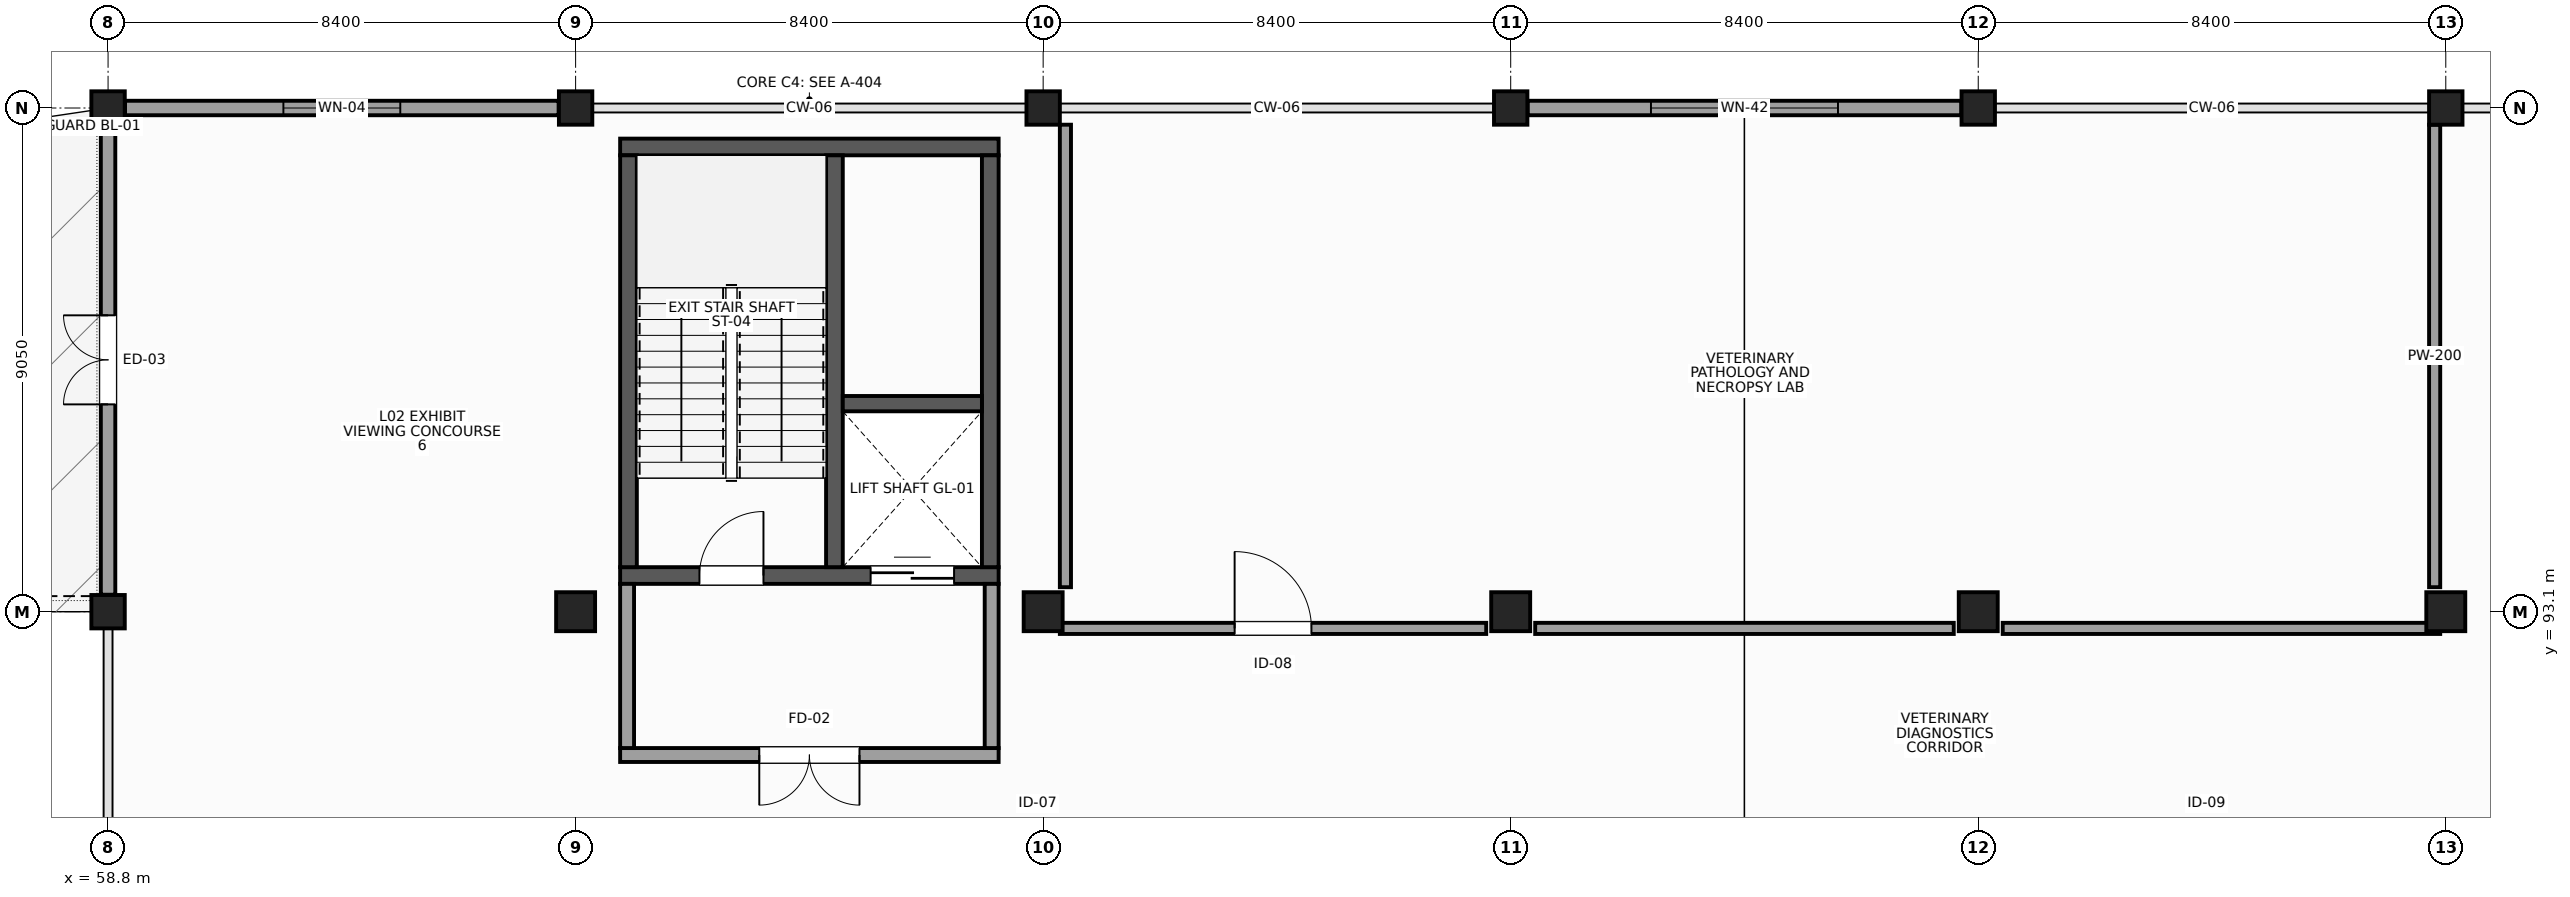
"""IFC4 building model, lengths in metres.
Left out: names, types, materials, properties, quantities, classifications, styles, units other than length and angle.
Written with IfcOpenShell. Run it as: python <this file> out.ifc"""

import sys

from ifc_helpers import new_model, si_unit, direction, frame, frame_2d, origin, origin_2d, place, context, subcontext, project, spatial, rectangle, extrude, element, fill, save


model = new_model("IFC4")
c1 = context("Model", 3, precision=1e-05, world=origin(), true_north=direction((0.0, 1.0)))
c2 = subcontext(c1, "Body", "Model", "MODEL_VIEW")
j1 = project(units=[si_unit("LENGTHUNIT", "METRE"), si_unit("PLANEANGLEUNIT", "RADIAN")], contexts=[c1])
p1 = place(None, origin())
s1 = spatial("IfcSite", under=j1, at=p1, CompositionType="ELEMENT")
p2 = place(p1, origin())
s2 = spatial("IfcBuilding", under=s1, at=p2, CompositionType="ELEMENT")
p3 = place(p2, frame((0.0, 0.0, 10.8)))
s3 = spatial("IfcBuildingStorey", under=s2, at=p3, CompositionType="ELEMENT", Elevation=10.8)
for number, where, z_axis, x_axis in (
    (1, (58.8, 93.1, 0.0), (0.0, 0.0, 1.0), (1.0, 0.0, 0.0)),
    (2, (58.8, 102.15, 0.0), (0.0, 0.0, 1.0), (1.0, 0.0, 0.0)),
):
    element("IfcColumn", number, at=place(p3, frame(where, z_axis=z_axis, x_axis=x_axis)), inside=s3, PredefinedType="COLUMN", context=c2, shape_type="SweptSolid", body=[
        extrude(rectangle(XDim=0.6, YDim=0.6, at=origin_2d()), origin(), (0.0, 0.0, 1.0), 4.8),
    ])
p4 = place(p3, frame((67.2, 93.1, 0.0), z_axis=(0.0, 0.0, 1.0), x_axis=(1.0, 0.0, 0.0)))
e3 = element("IfcColumn", 3, at=p4, inside=s3, PredefinedType="COLUMN", context=c2, shape_type="SweptSolid", body=[
    extrude(rectangle(XDim=0.7, YDim=0.7, at=origin_2d()), origin(), (0.0, 0.0, 1.0), 4.8),
])
p5 = place(p3, frame((67.2, 102.15, 0.0), z_axis=(0.0, 0.0, 1.0), x_axis=(1.0, 0.0, 0.0)))
e4 = element("IfcColumn", 4, at=p5, inside=s3, PredefinedType="COLUMN", context=c2, shape_type="SweptSolid", body=[
    extrude(rectangle(XDim=0.6, YDim=0.6, at=origin_2d()), origin(), (0.0, 0.0, 1.0), 4.8),
])
p6 = place(p3, frame((75.6, 93.1, 0.0), z_axis=(0.0, 0.0, 1.0), x_axis=(1.0, 0.0, 0.0)))
e5 = element("IfcColumn", 5, at=p6, inside=s3, PredefinedType="COLUMN", context=c2, shape_type="SweptSolid", body=[
    extrude(rectangle(XDim=0.7, YDim=0.7, at=origin_2d()), origin(), (0.0, 0.0, 1.0), 4.8),
])
p7 = place(p3, frame((75.6, 102.15, 0.0), z_axis=(0.0, 0.0, 1.0), x_axis=(1.0, 0.0, 0.0)))
e6 = element("IfcColumn", 6, at=p7, inside=s3, PredefinedType="COLUMN", context=c2, shape_type="SweptSolid", body=[
    extrude(rectangle(XDim=0.6, YDim=0.6, at=origin_2d()), origin(), (0.0, 0.0, 1.0), 4.8),
])
p8 = place(p3, frame((84.0, 93.1, 0.0), z_axis=(0.0, 0.0, 1.0), x_axis=(1.0, 0.0, 0.0)))
e7 = element("IfcColumn", 7, at=p8, inside=s3, PredefinedType="COLUMN", context=c2, shape_type="SweptSolid", body=[
    extrude(rectangle(XDim=0.7, YDim=0.7, at=origin_2d()), origin(), (0.0, 0.0, 1.0), 4.8),
])
p9 = place(p3, frame((84.0, 102.15, 0.0), z_axis=(0.0, 0.0, 1.0), x_axis=(1.0, 0.0, 0.0)))
e8 = element("IfcColumn", 8, at=p9, inside=s3, PredefinedType="COLUMN", context=c2, shape_type="SweptSolid", body=[
    extrude(rectangle(XDim=0.6, YDim=0.6, at=origin_2d()), origin(), (0.0, 0.0, 1.0), 4.8),
])
p10 = place(p3, frame((92.4, 93.1, 0.0), z_axis=(0.0, 0.0, 1.0), x_axis=(1.0, 0.0, 0.0)))
e9 = element("IfcColumn", 9, at=p10, inside=s3, PredefinedType="COLUMN", context=c2, shape_type="SweptSolid", body=[
    extrude(rectangle(XDim=0.7, YDim=0.7, at=origin_2d()), origin(), (0.0, 0.0, 1.0), 4.8),
])
p11 = place(p3, frame((92.4, 102.15, 0.0), z_axis=(0.0, 0.0, 1.0), x_axis=(1.0, 0.0, 0.0)))
e10 = element("IfcColumn", 10, at=p11, inside=s3, PredefinedType="COLUMN", context=c2, shape_type="SweptSolid", body=[
    extrude(rectangle(XDim=0.6, YDim=0.6, at=origin_2d()), origin(), (0.0, 0.0, 1.0), 4.8),
])
p12 = place(p3, frame((100.8, 93.1, 0.0), z_axis=(0.0, 0.0, 1.0), x_axis=(1.0, 0.0, 0.0)))
e11 = element("IfcColumn", 11, at=p12, inside=s3, PredefinedType="COLUMN", context=c2, shape_type="SweptSolid", body=[
    extrude(rectangle(XDim=0.7, YDim=0.7, at=origin_2d()), origin(), (0.0, 0.0, 1.0), 4.8),
])
p13 = place(p3, frame((100.8, 102.15, 0.0), z_axis=(0.0, 0.0, 1.0), x_axis=(1.0, 0.0, 0.0)))
e12 = element("IfcColumn", 12, at=p13, inside=s3, PredefinedType="COLUMN", context=c2, shape_type="SweptSolid", body=[
    extrude(rectangle(XDim=0.6, YDim=0.6, at=origin_2d()), origin(), (0.0, 0.0, 1.0), 4.8),
])
p14 = place(p3, frame((92.095, 102.15, 0.0), z_axis=(0.0, 0.0, 1.0), x_axis=(-1.0, 0.0, 0.0)))
e13 = element("IfcWall", 13, at=p14, inside=s3, PredefinedType="STANDARD", context=c2, shape_type="SweptSolid", body=[
    extrude(rectangle(XDim=7.79, YDim=0.26, at=frame_2d((3.895, 0.0))), origin(), (0.0, 0.0, 1.0), 3.63),
])
p15 = place(p14, frame((2.215, 0.0, 0.95)))
e14 = element("IfcOpeningElement", 14, at=p15, cuts=e13, PredefinedType="OPENING", context=c2, shape_type="SweptSolid", body=[
    extrude(rectangle(XDim=3.36, YDim=1.96, at=frame_2d((1.68, 0.98))), frame((0.0, 0.14, 0.0), z_axis=(0.0, -1.0, 0.0), x_axis=(1.0, 0.0, 0.0)), (0.0, 0.0, 1.0), 0.28),
])
p16 = place(p3, frame((66.895, 102.15, 0.0), z_axis=(0.0, 0.0, 1.0), x_axis=(-1.0, 0.0, 0.0)))
e15 = element("IfcWall", 15, at=p16, inside=s3, PredefinedType="STANDARD", context=c2, shape_type="SweptSolid", body=[
    extrude(rectangle(XDim=7.79, YDim=0.26, at=frame_2d((3.895, 0.0))), origin(), (0.0, 0.0, 1.0), 3.63),
])
p17 = place(p16, frame((2.845, 0.0, 0.95)))
e16 = element("IfcOpeningElement", 16, at=p17, cuts=e15, PredefinedType="OPENING", context=c2, shape_type="SweptSolid", body=[
    extrude(rectangle(XDim=2.1, YDim=2.1, at=frame_2d((1.05, 1.05))), frame((0.0, 0.14, 0.0), z_axis=(0.0, -1.0, 0.0), x_axis=(1.0, 0.0, 0.0)), (0.0, 0.0, 1.0), 0.28),
])
p18 = place(p3, frame((58.8, 101.845, 0.0), z_axis=(0.0, 0.0, 1.0), x_axis=(0.0, -1.0, 0.0)))
e17 = element("IfcWall", 17, at=p18, inside=s3, PredefinedType="STANDARD", context=c2, shape_type="SweptSolid", body=[
    extrude(rectangle(XDim=8.44, YDim=0.26, at=frame_2d((4.22, 0.0))), origin(), (0.0, 0.0, 1.0), 3.65),
])
p19 = place(p18, frame((3.42, 0.0, 0.0)))
e18 = element("IfcOpeningElement", 18, at=p19, cuts=e17, PredefinedType="OPENING", context=c2, shape_type="SweptSolid", body=[
    extrude(rectangle(XDim=1.6, YDim=2.25, at=frame_2d((0.8, 1.125))), frame((0.0, 0.14, 0.0), z_axis=(0.0, -1.0, 0.0), x_axis=(1.0, 0.0, 0.0)), (0.0, 0.0, 1.0), 0.28),
])
p20 = place(p3, frame((68.0, 93.75, 0.0), z_axis=(0.0, 0.0, 1.0), x_axis=(1.0, 0.0, 0.0)))
e19 = element("IfcWall", 19, at=p20, inside=s3, PredefinedType="SHEAR", context=c2, shape_type="SweptSolid", body=[
    extrude(rectangle(XDim=6.8, YDim=0.3, at=frame_2d((3.4, 0.0))), origin(), (0.0, 0.0, 1.0), 4.5),
])
p21 = place(p20, frame((1.425, 0.0, 0.0)))
e20 = element("IfcOpeningElement", 20, at=p21, cuts=e19, PredefinedType="OPENING", context=c2, shape_type="SweptSolid", body=[
    extrude(rectangle(XDim=1.15, YDim=2.2, at=frame_2d((0.575, 1.1))), frame((0.0, 0.16, 0.0), z_axis=(0.0, -1.0, 0.0), x_axis=(1.0, 0.0, 0.0)), (0.0, 0.0, 1.0), 0.32),
])
p22 = place(p20, frame((4.5, 0.0, 0.0)))
e21 = element("IfcOpeningElement", 21, at=p22, cuts=e19, PredefinedType="OPENING", context=c2, shape_type="SweptSolid", body=[
    extrude(rectangle(XDim=1.5, YDim=2.3, at=frame_2d((0.75, 1.15))), frame((0.0, 0.16, 0.0), z_axis=(0.0, -1.0, 0.0), x_axis=(1.0, 0.0, 0.0)), (0.0, 0.0, 1.0), 0.32),
])
p23 = place(p3, frame((68.0, 101.45, 0.0), z_axis=(0.0, 0.0, 1.0), x_axis=(1.0, 0.0, 0.0)))
e22 = element("IfcWall", 22, at=p23, inside=s3, PredefinedType="SHEAR", context=c2, shape_type="SweptSolid", body=[
    extrude(rectangle(XDim=6.8, YDim=0.3, at=frame_2d((3.4, 0.0))), origin(), (0.0, 0.0, 1.0), 4.5),
])
for number, where, z_axis, x_axis in (
    (23, (68.15, 93.9, 0.0), (0.0, 0.0, 1.0), (0.0, 1.0, 0.0)),
    (24, (74.65, 93.9, 0.0), (0.0, 0.0, 1.0), (0.0, 1.0, 0.0)),
    (25, (71.85, 93.9, 0.0), (0.0, 0.0, 1.0), (0.0, 1.0, 0.0)),
):
    element("IfcWall", number, at=place(p3, frame(where, z_axis=z_axis, x_axis=x_axis)), inside=s3, PredefinedType="SHEAR", context=c2, shape_type="SweptSolid", body=[
        extrude(rectangle(XDim=7.4, YDim=0.3, at=frame_2d((3.7, 0.0))), origin(), (0.0, 0.0, 1.0), 4.5),
    ])
p24 = place(p3, frame((72.0, 96.838, 0.0), z_axis=(0.0, 0.0, 1.0), x_axis=(1.0, 0.0, 0.0)))
e26 = element("IfcWall", 26, at=p24, inside=s3, PredefinedType="SHEAR", context=c2, shape_type="SweptSolid", body=[
    extrude(rectangle(XDim=2.5, YDim=0.275, at=frame_2d((1.25, 0.0))), origin(), (0.0, 0.0, 1.0), 4.5),
])
p25 = place(p3, frame((68.0, 90.525, 0.0), z_axis=(0.0, 0.0, 1.0), x_axis=(1.0, 0.0, 0.0)))
e27 = element("IfcWall", 27, at=p25, inside=s3, PredefinedType="PARTITIONING", context=c2, shape_type="SweptSolid", body=[
    extrude(rectangle(XDim=6.8, YDim=0.25, at=frame_2d((3.4, 0.0))), origin(), (0.0, 0.0, 1.0), 4.5),
])
p26 = place(p25, frame((2.5, 0.0, 0.0)))
e28 = element("IfcOpeningElement", 28, at=p26, cuts=e27, PredefinedType="OPENING", context=c2, shape_type="SweptSolid", body=[
    extrude(rectangle(XDim=1.8, YDim=2.25, at=frame_2d((0.9, 1.125))), frame((0.0, 0.135, 0.0), z_axis=(0.0, -1.0, 0.0), x_axis=(1.0, 0.0, 0.0)), (0.0, 0.0, 1.0), 0.27),
])
for number, where, z_axis, x_axis in (
    (29, (68.125, 90.65, 0.0), (0.0, 0.0, 1.0), (0.0, 1.0, 0.0)),
    (30, (74.675, 90.65, 0.0), (0.0, 0.0, 1.0), (0.0, 1.0, 0.0)),
):
    element("IfcWall", number, at=place(p3, frame(where, z_axis=z_axis, x_axis=x_axis)), inside=s3, PredefinedType="PARTITIONING", context=c2, shape_type="SweptSolid", body=[
        extrude(rectangle(XDim=2.95, YDim=0.25, at=frame_2d((1.475, 0.0))), origin(), (0.0, 0.0, 1.0), 3.73),
    ])
p27 = place(p3, frame((75.9, 92.8, 0.0), z_axis=(0.0, 0.0, 1.0), x_axis=(1.0, 0.0, 0.0)))
e31 = element("IfcWall", 31, at=p27, inside=s3, PredefinedType="PARTITIONING", context=c2, shape_type="SweptSolid", body=[
    extrude(rectangle(XDim=7.66, YDim=0.2, at=frame_2d((3.83, 0.0))), origin(), (0.0, 0.0, 1.0), 3.73),
])
p28 = place(p27, frame((3.14, 0.0, 0.0)))
e32 = element("IfcOpeningElement", 32, at=p28, cuts=e31, PredefinedType="OPENING", context=c2, shape_type="SweptSolid", body=[
    extrude(rectangle(XDim=1.38, YDim=2.3, at=frame_2d((0.69, 1.15))), frame((0.0, 0.11, 0.0), z_axis=(0.0, -1.0, 0.0), x_axis=(1.0, 0.0, 0.0)), (0.0, 0.0, 1.0), 0.22),
])
p29 = place(p3, frame((84.44, 92.8, 0.0), z_axis=(0.0, 0.0, 1.0), x_axis=(1.0, 0.0, 0.0)))
e33 = element("IfcWall", 33, at=p29, inside=s3, PredefinedType="PARTITIONING", context=c2, shape_type="SweptSolid", body=[
    extrude(rectangle(XDim=7.52, YDim=0.2, at=frame_2d((3.76, 0.0))), origin(), (0.0, 0.0, 1.0), 3.73),
])
p30 = place(p3, frame((92.84, 92.8, 0.0), z_axis=(0.0, 0.0, 1.0), x_axis=(1.0, 0.0, 0.0)))
e34 = element("IfcWall", 34, at=p30, inside=s3, PredefinedType="PARTITIONING", context=c2, shape_type="SweptSolid", body=[
    extrude(rectangle(XDim=7.86, YDim=0.2, at=frame_2d((3.93, 0.0))), origin(), (0.0, 0.0, 1.0), 3.73),
])
for number, where, z_axis, x_axis in (
    (35, (100.6, 93.54, 0.0), (0.0, 0.0, 1.0), (0.0, 1.0, 0.0)),
    (36, (76.0, 93.54, 0.0), (0.0, 0.0, 1.0), (0.0, 1.0, 0.0)),
):
    element("IfcWall", number, at=place(p3, frame(where, z_axis=z_axis, x_axis=x_axis)), inside=s3, PredefinedType="PARTITIONING", context=c2, shape_type="SweptSolid", body=[
        extrude(rectangle(XDim=8.31, YDim=0.2, at=frame_2d((4.155, 0.0))), origin(), (0.0, 0.0, 1.0), 3.63),
    ])
p31 = place(p15, origin())
e37 = element("IfcWindow", 37, at=p31, inside=s3, PartitioningType="SINGLE_PANEL", PredefinedType="WINDOW", context=c2, shape_type="SweptSolid", body=[
    extrude(rectangle(XDim=3.36, YDim=1.96, at=frame_2d((1.68, 0.98))), frame((0.0, 0.03, 0.0), z_axis=(0.0, -1.0, 0.0), x_axis=(1.0, 0.0, 0.0)), (0.0, 0.0, 1.0), 0.06),
])
fill(e14, e37)
p32 = place(p17, origin())
e38 = element("IfcWindow", 38, at=p32, inside=s3, PartitioningType="SINGLE_PANEL", PredefinedType="WINDOW", context=c2, shape_type="SweptSolid", body=[
    extrude(rectangle(XDim=2.1, YDim=2.1, at=frame_2d((1.05, 1.05))), frame((0.0, 0.03, 0.0), z_axis=(0.0, -1.0, 0.0), x_axis=(1.0, 0.0, 0.0)), (0.0, 0.0, 1.0), 0.06),
])
fill(e16, e38)
p33 = place(p19, frame((1.6, 0.0, 0.0), z_axis=(0.0, 0.0, 1.0), x_axis=(-1.0, 0.0, 0.0)))
e39 = element("IfcDoor", 39, at=p33, inside=s3, OperationType="DOUBLE_DOOR_SINGLE_SWING", PredefinedType="DOOR", context=c2, shape_type="SweptSolid", body=[
    extrude(rectangle(XDim=1.6, YDim=2.25, at=frame_2d((0.8, 1.125))), frame((0.0, 0.025, 0.0), z_axis=(0.0, -1.0, 0.0), x_axis=(1.0, 0.0, 0.0)), (0.0, 0.0, 1.0), 0.05),
])
fill(e18, e39)
p34 = place(p21, origin())
e40 = element("IfcDoor", 40, at=p34, inside=s3, OperationType="SINGLE_SWING_RIGHT", PredefinedType="DOOR", context=c2, shape_type="SweptSolid", body=[
    extrude(rectangle(XDim=1.15, YDim=2.2, at=frame_2d((0.575, 1.1))), frame((0.0, 0.025, 0.0), z_axis=(0.0, -1.0, 0.0), x_axis=(1.0, 0.0, 0.0)), (0.0, 0.0, 1.0), 0.05),
])
fill(e20, e40)
p35 = place(p22, origin())
e41 = element("IfcDoor", 41, at=p35, inside=s3, OperationType="DOUBLE_DOOR_SLIDING", PredefinedType="DOOR", context=c2, shape_type="SweptSolid", body=[
    extrude(rectangle(XDim=1.5, YDim=2.3, at=frame_2d((0.75, 1.15))), frame((0.0, 0.025, 0.0), z_axis=(0.0, -1.0, 0.0), x_axis=(1.0, 0.0, 0.0)), (0.0, 0.0, 1.0), 0.05),
])
fill(e21, e41)
p36 = place(p26, frame((1.8, 0.0, 0.0), z_axis=(0.0, 0.0, 1.0), x_axis=(-1.0, 0.0, 0.0)))
e42 = element("IfcDoor", 42, at=p36, inside=s3, OperationType="DOUBLE_DOOR_SINGLE_SWING", PredefinedType="DOOR", context=c2, shape_type="SweptSolid", body=[
    extrude(rectangle(XDim=1.8, YDim=2.25, at=frame_2d((0.9, 1.125))), frame((0.0, 0.025, 0.0), z_axis=(0.0, -1.0, 0.0), x_axis=(1.0, 0.0, 0.0)), (0.0, 0.0, 1.0), 0.05),
])
fill(e28, e42)
p37 = place(p28, origin())
e43 = element("IfcDoor", 43, at=p37, inside=s3, OperationType="SINGLE_SWING_LEFT", PredefinedType="DOOR", context=c2, shape_type="SweptSolid", body=[
    extrude(rectangle(XDim=1.38, YDim=2.3, at=frame_2d((0.69, 1.15))), frame((0.0, 0.025, 0.0), z_axis=(0.0, -1.0, 0.0), x_axis=(1.0, 0.0, 0.0)), (0.0, 0.0, 1.0), 0.05),
])
fill(e32, e43)
save(model, sys.argv[1])
